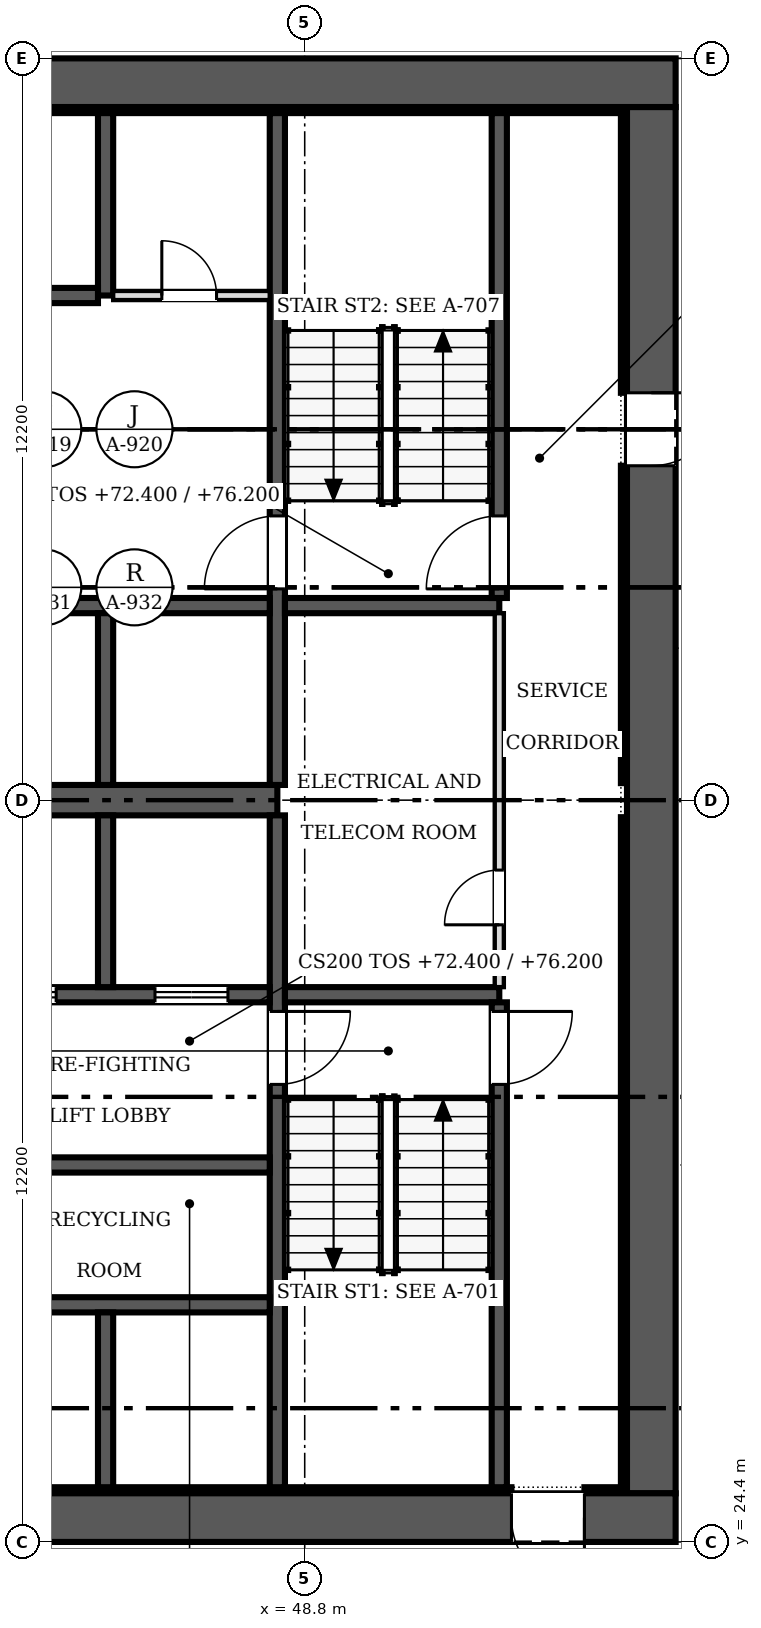
"""IFC4 building model, lengths in metres.
Left out: names, types, materials, properties, quantities, classifications, styles, units other than length and angle.
Written with IfcOpenShell. Run it as: python <this file> out.ifc"""

import sys

from ifc_helpers import new_model, si_unit, direction, frame, frame_2d, origin, place, context, subcontext, project, spatial, rectangle, extrude, source, transform, mapped, element, fill, save


model = new_model("IFC4")
c1 = context("Model", 3, precision=1e-05, world=origin(), true_north=direction((0.0, 1.0)))
c2 = subcontext(c1, "Body", "Model", "MODEL_VIEW")
j1 = project(units=[si_unit("LENGTHUNIT", "METRE"), si_unit("PLANEANGLEUNIT", "RADIAN")], contexts=[c1])
p1 = place(None, origin())
s1 = spatial("IfcSite", under=j1, at=p1, CompositionType="ELEMENT")
p2 = place(p1, origin())
s2 = spatial("IfcBuilding", under=s1, at=p2, CompositionType="ELEMENT")
p3 = place(p2, frame((0.0, 0.0, 72.4)))
s3 = spatial("IfcBuildingStorey", under=s2, at=p3, CompositionType="ELEMENT", Elevation=72.4)
p4 = place(p3, frame((54.9, 24.8, 0.0), z_axis=(0.0, 0.0, 1.0), x_axis=(-1.0, 0.0, 0.0)))
e1 = element("IfcWall", 1, at=p4, inside=s3, PredefinedType="SHEAR", context=c2, shape_type="SweptSolid", body=[
    extrude(rectangle(XDim=24.4, YDim=0.8, at=frame_2d((12.2, 0.0))), origin(), (0.0, 0.0, 1.0), 3.8),
])
m1 = source(origin(), c2, "Body", "SweptSolid", [
    extrude(rectangle(XDim=1.2, YDim=2.1, at=frame_2d((0.6, 1.05))), frame((0.0, 0.41, 0.0), z_axis=(0.0, -1.0, 0.0), x_axis=(1.0, 0.0, 0.0)), (0.0, 0.0, 1.0), 0.82),
])
p5 = place(p4, frame((1.5, 0.0, 0.0)))
e2 = element("IfcOpeningElement", 2, at=p5, cuts=e1, PredefinedType="OPENING", context=c2, shape_type="MappedRepresentation", body=[
    mapped(m1, transform((0.0, 0.0, 0.0), scale=1.0)),
])
p6 = place(p3, frame((30.5, 48.4, 0.0), z_axis=(0.0, 0.0, 1.0), x_axis=(1.0, 0.0, 0.0)))
e3 = element("IfcWall", 3, at=p6, inside=s3, PredefinedType="SHEAR", context=c2, shape_type="SweptSolid", body=[
    extrude(rectangle(XDim=24.4, YDim=0.8, at=frame_2d((12.2, 0.0))), origin(), (0.0, 0.0, 1.0), 3.8),
])
p7 = place(p3, frame((54.5, 48.0, 0.0), z_axis=(0.0, 0.0, 1.0), x_axis=(0.0, -1.0, 0.0)))
e4 = element("IfcWall", 4, at=p7, inside=s3, PredefinedType="SHEAR", context=c2, shape_type="SweptSolid", body=[
    extrude(rectangle(XDim=22.8, YDim=0.8, at=frame_2d((11.4, 0.0))), origin(), (0.0, 0.0, 1.0), 3.8),
])
p8 = place(p7, frame((4.7, 0.0, 0.0)))
e5 = element("IfcOpeningElement", 5, at=p8, cuts=e4, PredefinedType="OPENING", context=c2, shape_type="MappedRepresentation", body=[
    mapped(m1, transform((0.0, 0.0, 0.0), scale=1.0)),
])
p9 = place(p3, frame((31.3, 25.25, 0.0), z_axis=(0.0, 0.0, 1.0), x_axis=(1.0, 0.0, 0.0)))
e6 = element("IfcWall", 6, at=p9, inside=s3, PredefinedType="SOLIDWALL", context=c2, shape_type="SweptSolid", body=[
    extrude(rectangle(XDim=20.9, YDim=0.1, at=frame_2d((10.45, 0.0))), origin(), (0.0, 0.0, 1.0), 3.8),
])
p10 = place(p3, frame((53.4, 25.25, 0.0), z_axis=(0.0, 0.0, 1.0), x_axis=(1.0, 0.0, 0.0)))
e7 = element("IfcWall", 7, at=p10, inside=s3, PredefinedType="SOLIDWALL", context=c2, shape_type="SweptSolid", body=[
    extrude(rectangle(XDim=0.7, YDim=0.1, at=frame_2d((0.35, 0.0))), origin(), (0.0, 0.0, 1.0), 3.8),
])
p11 = place(p3, frame((31.3, 47.95, 0.0), z_axis=(0.0, 0.0, 1.0), x_axis=(1.0, 0.0, 0.0)))
e8 = element("IfcWall", 8, at=p11, inside=s3, PredefinedType="SOLIDWALL", context=c2, shape_type="SweptSolid", body=[
    extrude(rectangle(XDim=22.8, YDim=0.1, at=frame_2d((11.4, 0.0))), origin(), (0.0, 0.0, 1.0), 3.8),
])
p12 = place(p3, frame((54.05, 25.3, 0.0), z_axis=(0.0, 0.0, 1.0), x_axis=(0.0, 1.0, 0.0)))
e9 = element("IfcWall", 9, at=p12, inside=s3, PredefinedType="SOLIDWALL", context=c2, shape_type="SweptSolid", body=[
    extrude(rectangle(XDim=11.02, YDim=0.1, at=frame_2d((5.51, 0.0))), origin(), (0.0, 0.0, 1.0), 3.8),
])
p13 = place(p3, frame((54.05, 36.88, 0.0), z_axis=(0.0, 0.0, 1.0), x_axis=(0.0, 1.0, 0.0)))
e10 = element("IfcWall", 10, at=p13, inside=s3, PredefinedType="SOLIDWALL", context=c2, shape_type="SweptSolid", body=[
    extrude(rectangle(XDim=5.22, YDim=0.1, at=frame_2d((2.61, 0.0))), origin(), (0.0, 0.0, 1.0), 3.8),
])
p14 = place(p3, frame((54.05, 43.3, 0.0), z_axis=(0.0, 0.0, 1.0), x_axis=(0.0, 1.0, 0.0)))
e11 = element("IfcWall", 11, at=p14, inside=s3, PredefinedType="SOLIDWALL", context=c2, shape_type="SweptSolid", body=[
    extrude(rectangle(XDim=4.6, YDim=0.1, at=frame_2d((2.3, 0.0))), origin(), (0.0, 0.0, 1.0), 3.8),
])
p15 = place(p3, frame((31.4, 36.6, 0.0), z_axis=(0.0, 0.0, 1.0), x_axis=(1.0, 0.0, 0.0)))
e12 = element("IfcWall", 12, at=p15, inside=s3, PredefinedType="SHEAR", context=c2, shape_type="SweptSolid", body=[
    extrude(rectangle(XDim=16.95, YDim=0.5, at=frame_2d((8.475, 0.0))), origin(), (0.0, 0.0, 1.0), 3.8),
])
p16 = place(p3, frame((48.35, 36.35, 0.0), z_axis=(0.0, 0.0, 1.0), x_axis=(0.0, -1.0, 0.0)))
e13 = element("IfcWall", 13, at=p16, inside=s3, PredefinedType="SOLIDWALL", context=c2, shape_type="SweptSolid", body=[
    extrude(rectangle(XDim=11.05, YDim=0.25, at=frame_2d((5.525, 0.0))), origin(), (0.0, 0.0, 1.0), 3.8),
])
m2 = source(origin(), c2, "Body", "SweptSolid", [
    extrude(rectangle(XDim=1.2, YDim=2.1, at=frame_2d((0.6, 1.05))), frame((0.0, 0.135, 0.0), z_axis=(0.0, -1.0, 0.0), x_axis=(1.0, 0.0, 0.0)), (0.0, 0.0, 1.0), 0.27),
])
p17 = place(p16, frame((3.225, 0.0, 0.0)))
e14 = element("IfcOpeningElement", 14, at=p17, cuts=e13, PredefinedType="OPENING", context=c2, shape_type="MappedRepresentation", body=[
    mapped(m2, transform((0.0, 0.0, 0.0), scale=1.0)),
])
p18 = place(p3, frame((48.35, 47.9, 0.0), z_axis=(0.0, 0.0, 1.0), x_axis=(0.0, -1.0, 0.0)))
e15 = element("IfcWall", 15, at=p18, inside=s3, PredefinedType="SOLIDWALL", context=c2, shape_type="SweptSolid", body=[
    extrude(rectangle(XDim=11.05, YDim=0.25, at=frame_2d((5.525, 0.0))), origin(), (0.0, 0.0, 1.0), 3.8),
])
p19 = place(p18, frame((6.625, 0.0, 0.0)))
e16 = element("IfcOpeningElement", 16, at=p19, cuts=e15, PredefinedType="OPENING", context=c2, shape_type="MappedRepresentation", body=[
    mapped(m2, transform((0.0, 0.0, 0.0), scale=1.0)),
])
p20 = place(p3, frame((48.225, 33.4, 0.0), z_axis=(0.0, 0.0, 1.0), x_axis=(-1.0, 0.0, 0.0)))
e17 = element("IfcWall", 17, at=p20, inside=s3, PredefinedType="SOLIDWALL", context=c2, shape_type="SweptSolid", body=[
    extrude(rectangle(XDim=5.275, YDim=0.25, at=frame_2d((2.638, 0.0))), origin(), (0.0, 0.0, 1.0), 3.8),
])
p21 = place(p20, frame((3.512, 0.0, 0.0)))
e18 = element("IfcOpeningElement", 18, at=p21, cuts=e17, PredefinedType="OPENING", context=c2, shape_type="MappedRepresentation", body=[
    mapped(m2, transform((0.0, 0.0, 0.0), scale=1.0)),
])
p22 = place(p20, frame((0.688, 0.0, 0.0)))
e19 = element("IfcOpeningElement", 19, at=p22, cuts=e17, PredefinedType="OPENING", context=c2, shape_type="MappedRepresentation", body=[
    mapped(m2, transform((0.0, 0.0, 0.0), scale=1.0)),
])
p23 = place(p3, frame((48.475, 33.4, 0.0), z_axis=(0.0, 0.0, 1.0), x_axis=(1.0, 0.0, 0.0)))
e20 = element("IfcWall", 20, at=p23, inside=s3, PredefinedType="SOLIDWALL", context=c2, shape_type="SweptSolid", body=[
    extrude(rectangle(XDim=3.525, YDim=0.25, at=frame_2d((1.762, 0.0))), origin(), (0.0, 0.0, 1.0), 3.8),
])
for number, where, z_axis, x_axis in (
    (21, (42.95, 28.3, 0.0), (0.0, 0.0, 1.0), (1.0, 0.0, 0.0)),
    (22, (42.95, 39.8, 0.0), (0.0, 0.0, 1.0), (1.0, 0.0, 0.0)),
):
    element("IfcWall", number, at=place(p3, frame(where, z_axis=z_axis, x_axis=x_axis)), inside=s3, PredefinedType="SOLIDWALL", context=c2, shape_type="SweptSolid", body=[
        extrude(rectangle(XDim=5.275, YDim=0.25, at=frame_2d((2.638, 0.0))), origin(), (0.0, 0.0, 1.0), 3.8),
    ])
p24 = place(p3, frame((48.475, 39.8, 0.0), z_axis=(0.0, 0.0, 1.0), x_axis=(1.0, 0.0, 0.0)))
e23 = element("IfcWall", 23, at=p24, inside=s3, PredefinedType="SOLIDWALL", context=c2, shape_type="SweptSolid", body=[
    extrude(rectangle(XDim=3.525, YDim=0.25, at=frame_2d((1.762, 0.0))), origin(), (0.0, 0.0, 1.0), 3.8),
])
p25 = place(p3, frame((52.0, 25.3, 0.0), z_axis=(0.0, 0.0, 1.0), x_axis=(0.0, 1.0, 0.0)))
e24 = element("IfcWall", 24, at=p25, inside=s3, PredefinedType="SOLIDWALL", context=c2, shape_type="SweptSolid", body=[
    extrude(rectangle(XDim=7.975, YDim=0.25, at=frame_2d((3.987, 0.0))), origin(), (0.0, 0.0, 1.0), 3.8),
])
p26 = place(p25, frame((6.625, 0.0, 0.0)))
e25 = element("IfcOpeningElement", 25, at=p26, cuts=e24, PredefinedType="OPENING", context=c2, shape_type="MappedRepresentation", body=[
    mapped(m2, transform((0.0, 0.0, 0.0), scale=1.0)),
])
p27 = place(p3, frame((52.0, 39.925, 0.0), z_axis=(0.0, 0.0, 1.0), x_axis=(0.0, 1.0, 0.0)))
e26 = element("IfcWall", 26, at=p27, inside=s3, PredefinedType="SOLIDWALL", context=c2, shape_type="SweptSolid", body=[
    extrude(rectangle(XDim=7.975, YDim=0.25, at=frame_2d((3.987, 0.0))), origin(), (0.0, 0.0, 1.0), 3.8),
])
p28 = place(p27, frame((0.15, 0.0, 0.0)))
e27 = element("IfcOpeningElement", 27, at=p28, cuts=e26, PredefinedType="OPENING", context=c2, shape_type="MappedRepresentation", body=[
    mapped(m2, transform((0.0, 0.0, 0.0), scale=1.0)),
])
p29 = place(p3, frame((45.525, 33.525, 0.0), z_axis=(0.0, 0.0, 1.0), x_axis=(0.0, 1.0, 0.0)))
e28 = element("IfcWall", 28, at=p29, inside=s3, PredefinedType="SOLIDWALL", context=c2, shape_type="SweptSolid", body=[
    extrude(rectangle(XDim=2.825, YDim=0.25, at=frame_2d((1.413, 0.0))), origin(), (0.0, 0.0, 1.0), 3.8),
])
p30 = place(p3, frame((45.525, 36.85, 0.0), z_axis=(0.0, 0.0, 1.0), x_axis=(0.0, 1.0, 0.0)))
e29 = element("IfcWall", 29, at=p30, inside=s3, PredefinedType="SOLIDWALL", context=c2, shape_type="SweptSolid", body=[
    extrude(rectangle(XDim=2.825, YDim=0.25, at=frame_2d((1.413, 0.0))), origin(), (0.0, 0.0, 1.0), 3.8),
])
p31 = place(p3, frame((42.95, 30.6, 0.0), z_axis=(0.0, 0.0, 1.0), x_axis=(1.0, 0.0, 0.0)))
e30 = element("IfcWall", 30, at=p31, inside=s3, PredefinedType="SOLIDWALL", context=c2, shape_type="SweptSolid", body=[
    extrude(rectangle(XDim=5.275, YDim=0.25, at=frame_2d((2.638, 0.0))), origin(), (0.0, 0.0, 1.0), 3.8),
])
p32 = place(p3, frame((45.525, 25.3, 0.0), z_axis=(0.0, 0.0, 1.0), x_axis=(0.0, 1.0, 0.0)))
e31 = element("IfcWall", 31, at=p32, inside=s3, PredefinedType="SOLIDWALL", context=c2, shape_type="SweptSolid", body=[
    extrude(rectangle(XDim=2.875, YDim=0.25, at=frame_2d((1.438, 0.0))), origin(), (0.0, 0.0, 1.0), 3.8),
])
p33 = place(p3, frame((45.525, 44.9, 0.0), z_axis=(0.0, 0.0, 1.0), x_axis=(0.0, 1.0, 0.0)))
e32 = element("IfcWall", 32, at=p33, inside=s3, PredefinedType="SOLIDWALL", context=c2, shape_type="SweptSolid", body=[
    extrude(rectangle(XDim=3.0, YDim=0.25, at=frame_2d((1.5, 0.0))), origin(), (0.0, 0.0, 1.0), 3.8),
])
p34 = place(p3, frame((42.95, 44.9, 0.0), z_axis=(0.0, 0.0, 1.0), x_axis=(1.0, 0.0, 0.0)))
e33 = element("IfcWall", 33, at=p34, inside=s3, PredefinedType="SOLIDWALL", context=c2, shape_type="SweptSolid", body=[
    extrude(rectangle(XDim=2.45, YDim=0.25, at=frame_2d((1.225, 0.0))), origin(), (0.0, 0.0, 1.0), 3.8),
])
p35 = place(p3, frame((52.0, 33.525, 0.0), z_axis=(0.0, 0.0, 1.0), x_axis=(0.0, 1.0, 0.0)))
e34 = element("IfcWall", 34, at=p35, inside=s3, PredefinedType="PARTITIONING", context=c2, shape_type="SweptSolid", body=[
    extrude(rectangle(XDim=6.15, YDim=0.15, at=frame_2d((3.075, 0.0))), origin(), (0.0, 0.0, 1.0), 3.6),
])
m3 = source(origin(), c2, "Body", "SweptSolid", [
    extrude(rectangle(XDim=0.9, YDim=2.1, at=frame_2d((0.45, 1.05))), frame((0.0, 0.085, 0.0), z_axis=(0.0, -1.0, 0.0), x_axis=(1.0, 0.0, 0.0)), (0.0, 0.0, 1.0), 0.17),
])
p36 = place(p35, frame((1.025, 0.0, 0.0)))
e35 = element("IfcOpeningElement", 35, at=p36, cuts=e34, PredefinedType="OPENING", context=c2, shape_type="MappedRepresentation", body=[
    mapped(m3, transform((0.0, 0.0, 0.0), scale=1.0)),
])
p37 = place(p3, frame((45.65, 44.9, 0.0), z_axis=(0.0, 0.0, 1.0), x_axis=(1.0, 0.0, 0.0)))
e36 = element("IfcWall", 36, at=p37, inside=s3, PredefinedType="PARTITIONING", context=c2, shape_type="SweptSolid", body=[
    extrude(rectangle(XDim=2.575, YDim=0.15, at=frame_2d((1.288, 0.0))), origin(), (0.0, 0.0, 1.0), 3.6),
])
p38 = place(p37, frame((0.8, 0.0, 0.0)))
e37 = element("IfcOpeningElement", 37, at=p38, cuts=e36, PredefinedType="OPENING", context=c2, shape_type="MappedRepresentation", body=[
    mapped(m3, transform((0.0, 0.0, 0.0), scale=1.0)),
])
m4 = source(origin(), c2, "Body", "SweptSolid", [
    extrude(rectangle(XDim=1.2, YDim=2.1, at=frame_2d((0.6, 1.05))), frame((0.0, 0.025, 0.0), z_axis=(0.0, -1.0, 0.0), x_axis=(1.0, 0.0, 0.0)), (0.0, 0.0, 1.0), 0.05),
])
p39 = place(p5, origin())
e38 = element("IfcDoor", 38, at=p39, inside=s3, OperationType="SINGLE_SWING_LEFT", PredefinedType="DOOR", context=c2, shape_type="MappedRepresentation", body=[
    mapped(m4, transform((0.0, 0.0, 0.0), scale=1.0)),
])
fill(e2, e38)
p40 = place(p8, origin())
e39 = element("IfcDoor", 39, at=p40, inside=s3, OperationType="SINGLE_SWING_LEFT", PredefinedType="DOOR", context=c2, shape_type="MappedRepresentation", body=[
    mapped(m4, transform((0.0, 0.0, 0.0), scale=1.0)),
])
fill(e5, e39)
p41 = place(p17, origin())
e40 = element("IfcDoor", 40, at=p41, inside=s3, OperationType="SINGLE_SWING_LEFT", PredefinedType="DOOR", context=c2, shape_type="MappedRepresentation", body=[
    mapped(m4, transform((0.0, 0.0, 0.0), scale=1.0)),
])
fill(e14, e40)
p42 = place(p19, origin())
e41 = element("IfcDoor", 41, at=p42, inside=s3, OperationType="SINGLE_SWING_RIGHT", PredefinedType="DOOR", context=c2, shape_type="MappedRepresentation", body=[
    mapped(m4, transform((0.0, 0.0, 0.0), scale=1.0)),
])
fill(e16, e41)
p43 = place(p21, origin())
e42 = element("IfcDoor", 42, at=p43, inside=s3, OperationType="DOUBLE_DOOR_SLIDING", PredefinedType="DOOR", context=c2, shape_type="MappedRepresentation", body=[
    mapped(m4, transform((0.0, 0.0, 0.0), scale=1.0)),
])
fill(e18, e42)
p44 = place(p22, origin())
e43 = element("IfcDoor", 43, at=p44, inside=s3, OperationType="DOUBLE_DOOR_SLIDING", PredefinedType="DOOR", context=c2, shape_type="MappedRepresentation", body=[
    mapped(m4, transform((0.0, 0.0, 0.0), scale=1.0)),
])
fill(e19, e43)
p45 = place(p26, origin())
e44 = element("IfcDoor", 44, at=p45, inside=s3, OperationType="SINGLE_SWING_RIGHT", PredefinedType="DOOR", context=c2, shape_type="MappedRepresentation", body=[
    mapped(m4, transform((0.0, 0.0, 0.0), scale=1.0)),
])
fill(e25, e44)
p46 = place(p28, origin())
e45 = element("IfcDoor", 45, at=p46, inside=s3, OperationType="SINGLE_SWING_LEFT", PredefinedType="DOOR", context=c2, shape_type="MappedRepresentation", body=[
    mapped(m4, transform((0.0, 0.0, 0.0), scale=1.0)),
])
fill(e27, e45)
m5 = source(origin(), c2, "Body", "SweptSolid", [
    extrude(rectangle(XDim=0.9, YDim=2.1, at=frame_2d((0.45, 1.05))), frame((0.0, 0.025, 0.0), z_axis=(0.0, -1.0, 0.0), x_axis=(1.0, 0.0, 0.0)), (0.0, 0.0, 1.0), 0.05),
])
p47 = place(p36, origin())
e46 = element("IfcDoor", 46, at=p47, inside=s3, OperationType="SINGLE_SWING_LEFT", PredefinedType="DOOR", context=c2, shape_type="MappedRepresentation", body=[
    mapped(m5, transform((0.0, 0.0, 0.0), scale=1.0)),
])
fill(e35, e46)
p48 = place(p38, origin())
e47 = element("IfcDoor", 47, at=p48, inside=s3, OperationType="SINGLE_SWING_LEFT", PredefinedType="DOOR", context=c2, shape_type="MappedRepresentation", body=[
    mapped(m5, transform((0.0, 0.0, 0.0), scale=1.0)),
])
fill(e37, e47)
save(model, sys.argv[1])
